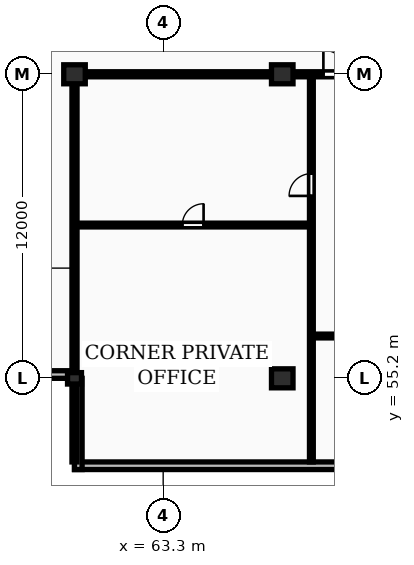
"""IFC4 building model, lengths in metres.
Left out: names, types, materials, properties, quantities, classifications, styles, units other than length and angle.
Written with IfcOpenShell. Run it as: python <this file> out.ifc"""

import sys

from ifc_helpers import new_model, si_unit, direction, frame, frame_2d, origin, origin_2d, place, context, subcontext, project, spatial, rectangle, extrude, element, fill, save


model = new_model("IFC4")
c1 = context("Model", 3, precision=1e-05, world=origin(), true_north=direction((0.0, 1.0)))
c2 = subcontext(c1, "Body", "Model", "MODEL_VIEW")
j1 = project(units=[si_unit("LENGTHUNIT", "METRE"), si_unit("PLANEANGLEUNIT", "RADIAN")], contexts=[c1])
p1 = place(None, origin())
s1 = spatial("IfcSite", under=j1, at=p1, CompositionType="ELEMENT")
p2 = place(p1, origin())
s2 = spatial("IfcBuilding", under=s1, at=p2, CompositionType="ELEMENT")
p3 = place(p2, frame((0.0, 0.0, 210.85)))
s3 = spatial("IfcBuildingStorey", under=s2, at=p3, CompositionType="ELEMENT", Elevation=210.85)
p4 = place(p3, frame((59.8, 55.2, 0.0), z_axis=(0.0, 0.0, 1.0), x_axis=(1.0, 0.0, 0.0)))
e1 = element("IfcColumn", 1, at=p4, inside=s3, PredefinedType="PILASTER", context=c2, shape_type="SweptSolid", body=[
    extrude(rectangle(XDim=0.55, YDim=0.45, at=origin_2d()), origin(), (0.0, 0.0, 1.0), 3.25),
])
for number, where, z_axis, x_axis in (
    (2, (59.8, 67.2, 0.0), (0.0, 0.0, 1.0), (1.0, 0.0, 0.0)),
    (3, (68.0, 55.2, 0.0), (0.0, 0.0, 1.0), (1.0, 0.0, 0.0)),
    (4, (68.0, 67.2, 0.0), (0.0, 0.0, 1.0), (1.0, 0.0, 0.0)),
):
    element("IfcColumn", number, at=place(p3, frame(where, z_axis=z_axis, x_axis=x_axis)), inside=s3, PredefinedType="COLUMN", context=c2, shape_type="SweptSolid", body=[
        extrude(rectangle(XDim=0.85, YDim=0.75, at=origin_2d()), origin(), (0.0, 0.0, 1.0), 3.25),
    ])
p5 = place(p3, frame((59.8, 51.75, 0.0), z_axis=(0.0, 0.0, 1.0), x_axis=(1.0, 0.0, 0.0)))
e5 = element("IfcWall", 5, at=p5, inside=s3, PredefinedType="STANDARD", context=c2, shape_type="SweptSolid", body=[
    extrude(rectangle(XDim=68.6, YDim=0.3, at=frame_2d((34.3, 0.0))), origin(), (0.0, 0.0, 1.0), 2.97),
])
p6 = place(p5, frame((13.025, 0.0, 0.85)))
e6 = element("IfcOpeningElement", 6, at=p6, cuts=e5, PredefinedType="OPENING", context=c2, shape_type="SweptSolid", body=[
    extrude(rectangle(XDim=1.8, YDim=1.8, at=frame_2d((0.9, 0.9))), frame((0.0, 0.16, 0.0), z_axis=(0.0, -1.0, 0.0), x_axis=(1.0, 0.0, 0.0)), (0.0, 0.0, 1.0), 0.32),
])
p7 = place(p5, frame((56.375, 0.0, 0.85)))
e7 = element("IfcOpeningElement", 7, at=p7, cuts=e5, PredefinedType="OPENING", context=c2, shape_type="SweptSolid", body=[
    extrude(rectangle(XDim=1.8, YDim=1.8, at=frame_2d((0.9, 0.9))), frame((0.0, 0.16, 0.0), z_axis=(0.0, -1.0, 0.0), x_axis=(1.0, 0.0, 0.0)), (0.0, 0.0, 1.0), 0.32),
])
p8 = place(p3, frame((56.2, 55.35, 0.0), z_axis=(0.0, 0.0, 1.0), x_axis=(1.0, 0.0, 0.0)))
e8 = element("IfcWall", 8, at=p8, inside=s3, PredefinedType="STANDARD", context=c2, shape_type="SweptSolid", body=[
    extrude(rectangle(XDim=3.6, YDim=0.3, at=frame_2d((1.8, 0.0))), origin(), (0.0, 0.0, 1.0), 2.97),
])
p9 = place(p3, frame((59.95, 55.2, 0.0), z_axis=(0.0, 0.0, 1.0), x_axis=(0.0, -1.0, 0.0)))
e9 = element("IfcWall", 9, at=p9, inside=s3, PredefinedType="STANDARD", context=c2, shape_type="SweptSolid", body=[
    extrude(rectangle(XDim=3.6, YDim=0.3, at=frame_2d((1.8, 0.0))), origin(), (0.0, 0.0, 1.0), 2.97),
])
p10 = place(p3, frame((59.8, 51.9, 0.0), z_axis=(0.0, 0.0, 1.0), x_axis=(0.0, 1.0, 0.0)))
e10 = element("IfcWall", 10, at=p10, inside=s3, PredefinedType="PARTITIONING", context=c2, shape_type="SweptSolid", body=[
    extrude(rectangle(XDim=15.3, YDim=0.2, at=frame_2d((7.65, 0.0))), origin(), (0.0, 0.0, 1.0), 2.277),
])
p11 = place(p3, frame((59.8, 61.25, 0.0), z_axis=(0.0, 0.0, 1.0), x_axis=(1.0, 0.0, 0.0)))
e11 = element("IfcWall", 11, at=p11, inside=s3, PredefinedType="PARTITIONING", context=c2, shape_type="SweptSolid", body=[
    extrude(rectangle(XDim=9.35, YDim=0.15, at=frame_2d((4.675, 0.0))), origin(), (0.0, 0.0, 1.0), 2.97),
])
p12 = place(p11, frame((4.255, 0.0, 0.0)))
e12 = element("IfcOpeningElement", 12, at=p12, cuts=e11, PredefinedType="OPENING", context=c2, shape_type="SweptSolid", body=[
    extrude(rectangle(XDim=0.84, YDim=2.04, at=frame_2d((0.42, 1.02))), frame((0.0, 0.085, 0.0), z_axis=(0.0, -1.0, 0.0), x_axis=(1.0, 0.0, 0.0)), (0.0, 0.0, 1.0), 0.17),
])
p13 = place(p3, frame((69.15, 51.9, 0.0), z_axis=(0.0, 0.0, 1.0), x_axis=(0.0, 1.0, 0.0)))
e13 = element("IfcWall", 13, at=p13, inside=s3, PredefinedType="PARTITIONING", context=c2, shape_type="SweptSolid", body=[
    extrude(rectangle(XDim=15.25, YDim=0.15, at=frame_2d((7.625, 0.0))), origin(), (0.0, 0.0, 1.0), 2.97),
])
p14 = place(p13, frame((10.5, 0.0, 0.0)))
e14 = element("IfcOpeningElement", 14, at=p14, cuts=e13, PredefinedType="OPENING", context=c2, shape_type="SweptSolid", body=[
    extrude(rectangle(XDim=0.88, YDim=2.06, at=frame_2d((0.44, 1.03))), frame((0.0, 0.085, 0.0), z_axis=(0.0, -1.0, 0.0), x_axis=(1.0, 0.0, 0.0)), (0.0, 0.0, 1.0), 0.17),
])
p15 = place(p3, frame((69.17, 56.87, 0.0), z_axis=(0.0, 0.0, 1.0), x_axis=(1.0, 0.0, 0.0)))
e15 = element("IfcWall", 15, at=p15, inside=s3, PredefinedType="PARTITIONING", context=c2, shape_type="SweptSolid", body=[
    extrude(rectangle(XDim=6.76, YDim=0.15, at=frame_2d((3.38, 0.0))), origin(), (0.0, 0.0, 1.0), 2.97),
])
p16 = place(p15, frame((1.362, 0.0, 0.0)))
e16 = element("IfcOpeningElement", 16, at=p16, cuts=e15, PredefinedType="OPENING", context=c2, shape_type="SweptSolid", body=[
    extrude(rectangle(XDim=0.84, YDim=2.04, at=frame_2d((0.42, 1.02))), frame((0.0, 0.085, 0.0), z_axis=(0.0, -1.0, 0.0), x_axis=(1.0, 0.0, 0.0)), (0.0, 0.0, 1.0), 0.17),
])
p17 = place(p15, frame((4.277, 0.0, 0.0)))
e17 = element("IfcOpeningElement", 17, at=p17, cuts=e15, PredefinedType="OPENING", context=c2, shape_type="SweptSolid", body=[
    extrude(rectangle(XDim=0.88, YDim=2.06, at=frame_2d((0.44, 1.03))), frame((0.0, 0.085, 0.0), z_axis=(0.0, -1.0, 0.0), x_axis=(1.0, 0.0, 0.0)), (0.0, 0.0, 1.0), 0.17),
])
p18 = place(p3, frame((59.8, 67.2, 0.0), z_axis=(0.0, 0.0, 1.0), x_axis=(1.0, 0.0, 0.0)))
e18 = element("IfcWall", 18, at=p18, inside=s3, PredefinedType="PARTITIONING", context=c2, shape_type="SweptSolid", body=[
    extrude(rectangle(XDim=16.15, YDim=0.2, at=frame_2d((8.075, 0.0))), origin(), (0.0, 0.0, 1.0), 2.433),
])
p19 = place(p18, frame((9.823, 0.0, 0.0)))
e19 = element("IfcOpeningElement", 19, at=p19, cuts=e18, PredefinedType="OPENING", context=c2, shape_type="SweptSolid", body=[
    extrude(rectangle(XDim=0.95, YDim=2.15, at=frame_2d((0.475, 1.075))), frame((0.0, 0.11, 0.0), z_axis=(0.0, -1.0, 0.0), x_axis=(1.0, 0.0, 0.0)), (0.0, 0.0, 1.0), 0.22),
])
p20 = place(p12, origin())
e20 = element("IfcDoor", 20, at=p20, inside=s3, OperationType="SINGLE_SWING_RIGHT", PredefinedType="DOOR", context=c2, shape_type="SweptSolid", body=[
    extrude(rectangle(XDim=0.84, YDim=2.04, at=frame_2d((0.42, 1.02))), frame((0.0, 0.025, 0.0), z_axis=(0.0, -1.0, 0.0), x_axis=(1.0, 0.0, 0.0)), (0.0, 0.0, 1.0), 0.05),
])
fill(e12, e20)
p21 = place(p14, origin())
e21 = element("IfcDoor", 21, at=p21, inside=s3, OperationType="SINGLE_SWING_LEFT", PredefinedType="DOOR", context=c2, shape_type="SweptSolid", body=[
    extrude(rectangle(XDim=0.88, YDim=2.06, at=frame_2d((0.44, 1.03))), frame((0.0, 0.025, 0.0), z_axis=(0.0, -1.0, 0.0), x_axis=(1.0, 0.0, 0.0)), (0.0, 0.0, 1.0), 0.05),
])
fill(e14, e21)
p22 = place(p19, origin())
e22 = element("IfcDoor", 22, at=p22, inside=s3, OperationType="SINGLE_SWING_LEFT", PredefinedType="DOOR", context=c2, shape_type="SweptSolid", body=[
    extrude(rectangle(XDim=0.95, YDim=2.15, at=frame_2d((0.475, 1.075))), frame((0.0, 0.025, 0.0), z_axis=(0.0, -1.0, 0.0), x_axis=(1.0, 0.0, 0.0)), (0.0, 0.0, 1.0), 0.05),
])
fill(e19, e22)
save(model, sys.argv[1])
